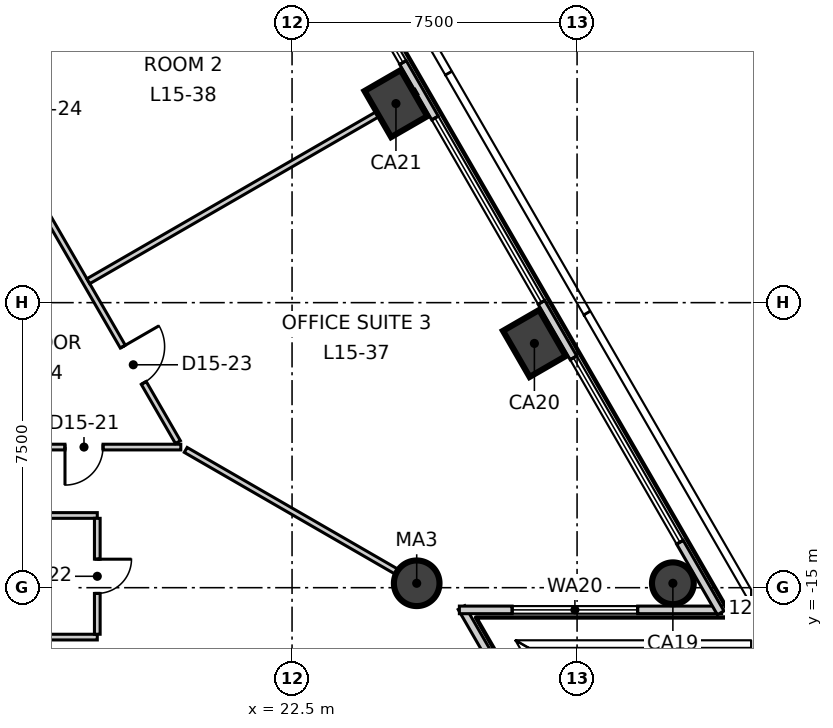
"""IFC4 building model, lengths in metres.
Left out: names, types, materials, properties, quantities, classifications, styles, units other than length and angle.
Written with IfcOpenShell. Run it as: python <this file> out.ifc"""

import sys

from ifc_helpers import new_model, si_unit, direction, frame, frame_2d, origin, origin_2d, place, context, subcontext, project, spatial, rectangle, circle, extrude, element, fill, save


model = new_model("IFC4")
c1 = context("Model", 3, precision=1e-05, world=origin(), true_north=direction((0.0, 1.0)))
c2 = subcontext(c1, "Body", "Model", "MODEL_VIEW")
j1 = project(units=[si_unit("LENGTHUNIT", "METRE"), si_unit("PLANEANGLEUNIT", "RADIAN")], contexts=[c1])
p1 = place(None, origin())
s1 = spatial("IfcSite", under=j1, at=p1, CompositionType="ELEMENT")
p2 = place(p1, origin())
s2 = spatial("IfcBuilding", under=s1, at=p2, CompositionType="ELEMENT")
p3 = place(p2, frame((0.0, 0.0, 71.3)))
s3 = spatial("IfcBuildingStorey", under=s2, at=p3, CompositionType="ELEMENT", Elevation=71.3)
p4 = place(p3, frame((32.521, -14.884, -0.3), z_axis=(0.0, 0.0, 1.0), x_axis=(-0.5, 0.866025403784, 0.0)))
e1 = element("IfcColumn", 1, at=p4, inside=s3, PredefinedType="COLUMN", context=c2, shape_type="SweptSolid", body=[
    extrude(circle(Radius=0.55, at=origin_2d()), origin(), (0.0, 0.0, 1.0), 4.0),
])
for number, where, z_axis, x_axis in (
    (2, (28.877, -8.573, -0.3), (0.0, 0.0, 1.0), (-0.5, 0.866, 0.0)),
    (3, (25.234, -2.262, -0.3), (0.0, 0.0, 1.0), (-0.5, 0.866, 0.0)),
):
    element("IfcColumn", number, at=place(p3, frame(where, z_axis=z_axis, x_axis=x_axis)), inside=s3, PredefinedType="COLUMN", context=c2, shape_type="SweptSolid", body=[
        extrude(rectangle(XDim=1.4, YDim=1.1, at=origin_2d()), origin(), (0.0, 0.0, 1.0), 4.0),
    ])
p5 = place(p3, frame((25.78, -14.884, -0.3), z_axis=(0.0, 0.0, 1.0), x_axis=(1.0, 0.0, 0.0)))
e4 = element("IfcColumn", 4, at=p5, inside=s3, PredefinedType="COLUMN", context=c2, shape_type="SweptSolid", body=[
    extrude(circle(Radius=0.6, at=origin_2d()), origin(), (0.0, 0.0, 1.0), 4.0),
])
p6 = place(p3, frame((30.408, -21.5, 0.0), z_axis=(0.0, 0.0, 1.0), x_axis=(-0.499902111801, 0.866081912187, 0.0)))
e5 = element("IfcWall", 5, at=p6, inside=s3, PredefinedType="ELEMENTEDWALL", context=c2, shape_type="SweptSolid", body=[
    extrude(rectangle(XDim=6.901, YDim=0.2, at=frame_2d((3.451, 0.0))), origin(), (0.0, 0.0, 1.0), 3.7),
])
p7 = place(p6, frame((1.99, 0.0, 0.9)))
e6 = element("IfcOpeningElement", 6, at=p7, cuts=e5, PredefinedType="OPENING", context=c2, shape_type="SweptSolid", body=[
    extrude(rectangle(XDim=3.3, YDim=2.5, at=frame_2d((1.65, 1.25))), frame((0.0, 0.11, 0.0), z_axis=(0.0, -1.0, 0.0), x_axis=(1.0, 0.0, 0.0)), (0.0, 0.0, 1.0), 0.22),
])
p8 = place(p3, frame((26.903, -15.584, 0.0), z_axis=(0.0, 0.0, 1.0), x_axis=(1.0, 0.0, 0.0)))
e7 = element("IfcWall", 7, at=p8, inside=s3, PredefinedType="ELEMENTEDWALL", context=c2, shape_type="SweptSolid", body=[
    extrude(rectangle(XDim=6.901, YDim=0.2, at=frame_2d((3.45, 0.0))), origin(), (0.0, 0.0, 1.0), 3.7),
])
p9 = place(p8, frame((1.39, 0.0, 0.9)))
e8 = element("IfcOpeningElement", 8, at=p9, cuts=e7, PredefinedType="OPENING", context=c2, shape_type="SweptSolid", body=[
    extrude(rectangle(XDim=3.3, YDim=2.5, at=frame_2d((1.65, 1.25))), frame((0.0, 0.11, 0.0), z_axis=(0.0, -1.0, 0.0), x_axis=(1.0, 0.0, 0.0)), (0.0, 0.0, 1.0), 0.22),
])
p10 = place(p3, frame((33.779, -15.662, 0.0), z_axis=(0.0, 0.0, 1.0), x_axis=(-0.500000131003, 0.86602532815, 0.0)))
e9 = element("IfcWall", 9, at=p10, inside=s3, PredefinedType="ELEMENTEDWALL", context=c2, shape_type="SweptSolid", body=[
    extrude(rectangle(XDim=60.886, YDim=0.2, at=frame_2d((30.443, 0.0))), origin(), (0.0, 0.0, 1.0), 3.7),
])
p11 = place(p10, frame((2.147, 0.0, 0.9)))
e10 = element("IfcOpeningElement", 10, at=p11, cuts=e9, PredefinedType="OPENING", context=c2, shape_type="SweptSolid", body=[
    extrude(rectangle(XDim=5.6, YDim=2.5, at=frame_2d((2.8, 1.25))), frame((0.0, 0.11, 0.0), z_axis=(0.0, -1.0, 0.0), x_axis=(1.0, 0.0, 0.0)), (0.0, 0.0, 1.0), 0.22),
])
p12 = place(p10, frame((9.434, 0.0, 0.9)))
e11 = element("IfcOpeningElement", 11, at=p12, cuts=e9, PredefinedType="OPENING", context=c2, shape_type="SweptSolid", body=[
    extrude(rectangle(XDim=5.6, YDim=2.5, at=frame_2d((2.8, 1.25))), frame((0.0, 0.11, 0.0), z_axis=(0.0, -1.0, 0.0), x_axis=(1.0, 0.0, 0.0)), (0.0, 0.0, 1.0), 0.22),
])
p13 = place(p10, frame((16.722, 0.0, 0.9)))
e12 = element("IfcOpeningElement", 12, at=p13, cuts=e9, PredefinedType="OPENING", context=c2, shape_type="SweptSolid", body=[
    extrude(rectangle(XDim=5.6, YDim=2.5, at=frame_2d((2.8, 1.25))), frame((0.0, 0.11, 0.0), z_axis=(0.0, -1.0, 0.0), x_axis=(1.0, 0.0, 0.0)), (0.0, 0.0, 1.0), 0.22),
])
p14 = place(p10, frame((24.009, 0.0, 0.9)))
e13 = element("IfcOpeningElement", 13, at=p14, cuts=e9, PredefinedType="OPENING", context=c2, shape_type="SweptSolid", body=[
    extrude(rectangle(XDim=5.6, YDim=2.5, at=frame_2d((2.8, 1.25))), frame((0.0, 0.11, 0.0), z_axis=(0.0, -1.0, 0.0), x_axis=(1.0, 0.0, 0.0)), (0.0, 0.0, 1.0), 0.22),
])
p15 = place(p10, frame((31.297, 0.0, 0.9)))
e14 = element("IfcOpeningElement", 14, at=p15, cuts=e9, PredefinedType="OPENING", context=c2, shape_type="SweptSolid", body=[
    extrude(rectangle(XDim=5.6, YDim=2.5, at=frame_2d((2.8, 1.25))), frame((0.0, 0.11, 0.0), z_axis=(0.0, -1.0, 0.0), x_axis=(1.0, 0.0, 0.0)), (0.0, 0.0, 1.0), 0.22),
])
p16 = place(p10, frame((38.584, 0.0, 0.9)))
e15 = element("IfcOpeningElement", 15, at=p16, cuts=e9, PredefinedType="OPENING", context=c2, shape_type="SweptSolid", body=[
    extrude(rectangle(XDim=5.6, YDim=2.5, at=frame_2d((2.8, 1.25))), frame((0.0, 0.11, 0.0), z_axis=(0.0, -1.0, 0.0), x_axis=(1.0, 0.0, 0.0)), (0.0, 0.0, 1.0), 0.22),
])
p17 = place(p10, frame((45.872, 0.0, 0.9)))
e16 = element("IfcOpeningElement", 16, at=p17, cuts=e9, PredefinedType="OPENING", context=c2, shape_type="SweptSolid", body=[
    extrude(rectangle(XDim=5.6, YDim=2.5, at=frame_2d((2.8, 1.25))), frame((0.0, 0.11, 0.0), z_axis=(0.0, -1.0, 0.0), x_axis=(1.0, 0.0, 0.0)), (0.0, 0.0, 1.0), 0.22),
])
p18 = place(p10, frame((53.16, 0.0, 0.9)))
e17 = element("IfcOpeningElement", 17, at=p18, cuts=e9, PredefinedType="OPENING", context=c2, shape_type="SweptSolid", body=[
    extrude(rectangle(XDim=5.6, YDim=2.5, at=frame_2d((2.8, 1.25))), frame((0.0, 0.11, 0.0), z_axis=(0.0, -1.0, 0.0), x_axis=(1.0, 0.0, 0.0)), (0.0, 0.0, 1.0), 0.22),
])
p19 = place(p3, frame((-19.422, -11.3, 0.0), z_axis=(0.0, 0.0, 1.0), x_axis=(1.0, 0.0, 0.0)))
e18 = element("IfcWall", 18, at=p19, inside=s3, PredefinedType="PARTITIONING", context=c2, shape_type="SweptSolid", body=[
    extrude(rectangle(XDim=38.994, YDim=0.15, at=frame_2d((19.497, 0.0))), origin(), (0.0, 0.0, 1.0), 3.7),
])
p20 = place(p19, frame((1.8, 0.0, 0.0)))
e19 = element("IfcOpeningElement", 19, at=p20, cuts=e18, PredefinedType="OPENING", context=c2, shape_type="SweptSolid", body=[
    extrude(rectangle(XDim=1.1, YDim=2.1, at=frame_2d((0.55, 1.05))), frame((0.0, 0.085, 0.0), z_axis=(0.0, -1.0, 0.0), x_axis=(1.0, 0.0, 0.0)), (0.0, 0.0, 1.0), 0.17),
])
p21 = place(p19, frame((9.197, 0.0, 0.0)))
e20 = element("IfcOpeningElement", 20, at=p21, cuts=e18, PredefinedType="OPENING", context=c2, shape_type="SweptSolid", body=[
    extrude(rectangle(XDim=1.0, YDim=2.1, at=frame_2d((0.5, 1.05))), frame((0.0, 0.085, 0.0), z_axis=(0.0, -1.0, 0.0), x_axis=(1.0, 0.0, 0.0)), (0.0, 0.0, 1.0), 0.17),
])
p22 = place(p19, frame((5.597, 0.0, 0.0)))
e21 = element("IfcOpeningElement", 21, at=p22, cuts=e18, PredefinedType="OPENING", context=c2, shape_type="SweptSolid", body=[
    extrude(rectangle(XDim=0.9, YDim=2.1, at=frame_2d((0.45, 1.05))), frame((0.0, 0.085, 0.0), z_axis=(0.0, -1.0, 0.0), x_axis=(1.0, 0.0, 0.0)), (0.0, 0.0, 1.0), 0.17),
])
p23 = place(p19, frame((23.284, 0.0, 0.0)))
e22 = element("IfcOpeningElement", 22, at=p23, cuts=e18, PredefinedType="OPENING", context=c2, shape_type="SweptSolid", body=[
    extrude(rectangle(XDim=1.1, YDim=2.1, at=frame_2d((0.55, 1.05))), frame((0.0, 0.085, 0.0), z_axis=(0.0, -1.0, 0.0), x_axis=(1.0, 0.0, 0.0)), (0.0, 0.0, 1.0), 0.17),
])
p24 = place(p19, frame((13.284, 0.0, 0.0)))
e23 = element("IfcOpeningElement", 23, at=p24, cuts=e18, PredefinedType="OPENING", context=c2, shape_type="SweptSolid", body=[
    extrude(rectangle(XDim=0.9, YDim=2.1, at=frame_2d((0.45, 1.05))), frame((0.0, 0.085, 0.0), z_axis=(0.0, -1.0, 0.0), x_axis=(1.0, 0.0, 0.0)), (0.0, 0.0, 1.0), 0.17),
])
p25 = place(p19, frame((16.484, 0.0, 0.0)))
e24 = element("IfcOpeningElement", 24, at=p25, cuts=e18, PredefinedType="OPENING", context=c2, shape_type="SweptSolid", body=[
    extrude(rectangle(XDim=0.9, YDim=2.1, at=frame_2d((0.45, 1.05))), frame((0.0, 0.085, 0.0), z_axis=(0.0, -1.0, 0.0), x_axis=(1.0, 0.0, 0.0)), (0.0, 0.0, 1.0), 0.17),
])
p26 = place(p19, frame((19.184, 0.0, 0.0)))
e25 = element("IfcOpeningElement", 25, at=p26, cuts=e18, PredefinedType="OPENING", context=c2, shape_type="SweptSolid", body=[
    extrude(rectangle(XDim=1.0, YDim=2.1, at=frame_2d((0.5, 1.05))), frame((0.0, 0.085, 0.0), z_axis=(0.0, -1.0, 0.0), x_axis=(1.0, 0.0, 0.0)), (0.0, 0.0, 1.0), 0.17),
])
p27 = place(p19, frame((29.86, 0.0, 0.0)))
e26 = element("IfcOpeningElement", 26, at=p27, cuts=e18, PredefinedType="OPENING", context=c2, shape_type="SweptSolid", body=[
    extrude(rectangle(XDim=1.0, YDim=2.1, at=frame_2d((0.5, 1.05))), frame((0.0, 0.085, 0.0), z_axis=(0.0, -1.0, 0.0), x_axis=(1.0, 0.0, 0.0)), (0.0, 0.0, 1.0), 0.17),
])
p28 = place(p19, frame((35.947, 0.0, 0.0)))
e27 = element("IfcOpeningElement", 27, at=p28, cuts=e18, PredefinedType="OPENING", context=c2, shape_type="SweptSolid", body=[
    extrude(rectangle(XDim=1.0, YDim=2.1, at=frame_2d((0.5, 1.05))), frame((0.0, 0.085, 0.0), z_axis=(0.0, -1.0, 0.0), x_axis=(1.0, 0.0, 0.0)), (0.0, 0.0, 1.0), 0.17),
])
p29 = place(p3, frame((19.702, -11.375, 0.0), z_axis=(0.0, 0.0, 1.0), x_axis=(0.866029632557, -0.499992675479, 0.0)))
e28 = element("IfcWall", 28, at=p29, inside=s3, PredefinedType="PARTITIONING", context=c2, shape_type="SweptSolid", body=[
    extrude(rectangle(XDim=7.638, YDim=0.15, at=frame_2d((3.819, 0.0))), origin(), (0.0, 0.0, 1.0), 3.1),
])
p30 = place(p3, frame((0.075, 22.47, 0.0), z_axis=(0.0, 0.0, 1.0), x_axis=(0.500002280369, -0.866024087209, 0.0)))
e29 = element("IfcWall", 29, at=p30, inside=s3, PredefinedType="PARTITIONING", context=c2, shape_type="SweptSolid", body=[
    extrude(rectangle(XDim=38.844, YDim=0.15, at=frame_2d((19.422, 0.0))), origin(), (0.0, 0.0, 1.0), 3.7),
])
p31 = place(p30, frame((35.944, 0.0, 0.0)))
e30 = element("IfcOpeningElement", 30, at=p31, cuts=e29, PredefinedType="OPENING", context=c2, shape_type="SweptSolid", body=[
    extrude(rectangle(XDim=1.1, YDim=2.1, at=frame_2d((0.55, 1.05))), frame((0.0, 0.085, 0.0), z_axis=(0.0, -1.0, 0.0), x_axis=(1.0, 0.0, 0.0)), (0.0, 0.0, 1.0), 0.17),
])
p32 = place(p30, frame((29.848, 0.0, 0.0)))
e31 = element("IfcOpeningElement", 31, at=p32, cuts=e29, PredefinedType="OPENING", context=c2, shape_type="SweptSolid", body=[
    extrude(rectangle(XDim=1.0, YDim=2.1, at=frame_2d((0.5, 1.05))), frame((0.0, 0.085, 0.0), z_axis=(0.0, -1.0, 0.0), x_axis=(1.0, 0.0, 0.0)), (0.0, 0.0, 1.0), 0.17),
])
p33 = place(p30, frame((14.46, 0.0, 0.0)))
e32 = element("IfcOpeningElement", 32, at=p33, cuts=e29, PredefinedType="OPENING", context=c2, shape_type="SweptSolid", body=[
    extrude(rectangle(XDim=1.1, YDim=2.1, at=frame_2d((0.55, 1.05))), frame((0.0, 0.085, 0.0), z_axis=(0.0, -1.0, 0.0), x_axis=(1.0, 0.0, 0.0)), (0.0, 0.0, 1.0), 0.17),
])
p34 = place(p30, frame((24.66, 0.0, 0.0)))
e33 = element("IfcOpeningElement", 33, at=p34, cuts=e29, PredefinedType="OPENING", context=c2, shape_type="SweptSolid", body=[
    extrude(rectangle(XDim=0.9, YDim=2.1, at=frame_2d((0.45, 1.05))), frame((0.0, 0.085, 0.0), z_axis=(0.0, -1.0, 0.0), x_axis=(1.0, 0.0, 0.0)), (0.0, 0.0, 1.0), 0.17),
])
p35 = place(p30, frame((21.46, 0.0, 0.0)))
e34 = element("IfcOpeningElement", 34, at=p35, cuts=e29, PredefinedType="OPENING", context=c2, shape_type="SweptSolid", body=[
    extrude(rectangle(XDim=0.9, YDim=2.1, at=frame_2d((0.45, 1.05))), frame((0.0, 0.085, 0.0), z_axis=(0.0, -1.0, 0.0), x_axis=(1.0, 0.0, 0.0)), (0.0, 0.0, 1.0), 0.17),
])
p36 = place(p30, frame((18.66, 0.0, 0.0)))
e35 = element("IfcOpeningElement", 35, at=p36, cuts=e29, PredefinedType="OPENING", context=c2, shape_type="SweptSolid", body=[
    extrude(rectangle(XDim=1.0, YDim=2.1, at=frame_2d((0.5, 1.05))), frame((0.0, 0.085, 0.0), z_axis=(0.0, -1.0, 0.0), x_axis=(1.0, 0.0, 0.0)), (0.0, 0.0, 1.0), 0.17),
])
p37 = place(p30, frame((6.785, 0.0, 0.0)))
e36 = element("IfcOpeningElement", 36, at=p37, cuts=e29, PredefinedType="OPENING", context=c2, shape_type="SweptSolid", body=[
    extrude(rectangle(XDim=1.0, YDim=2.1, at=frame_2d((0.5, 1.05))), frame((0.0, 0.085, 0.0), z_axis=(0.0, -1.0, 0.0), x_axis=(1.0, 0.0, 0.0)), (0.0, 0.0, 1.0), 0.17),
])
p38 = place(p30, frame((10.485, 0.0, 0.0)))
e37 = element("IfcOpeningElement", 37, at=p38, cuts=e29, PredefinedType="OPENING", context=c2, shape_type="SweptSolid", body=[
    extrude(rectangle(XDim=0.9, YDim=2.1, at=frame_2d((0.45, 1.05))), frame((0.0, 0.085, 0.0), z_axis=(0.0, -1.0, 0.0), x_axis=(1.0, 0.0, 0.0)), (0.0, 0.0, 1.0), 0.17),
])
p39 = place(p30, frame((1.796, 0.0, 0.0)))
e38 = element("IfcOpeningElement", 38, at=p39, cuts=e29, PredefinedType="OPENING", context=c2, shape_type="SweptSolid", body=[
    extrude(rectangle(XDim=1.1, YDim=2.1, at=frame_2d((0.55, 1.05))), frame((0.0, 0.085, 0.0), z_axis=(0.0, -1.0, 0.0), x_axis=(1.0, 0.0, 0.0)), (0.0, 0.0, 1.0), 0.17),
])
p40 = place(p3, frame((17.139, -6.936, 0.0), z_axis=(0.0, 0.0, 1.0), x_axis=(0.866008152443, 0.500029879009, 0.0)))
e39 = element("IfcWall", 39, at=p40, inside=s3, PredefinedType="PARTITIONING", context=c2, shape_type="SweptSolid", body=[
    extrude(rectangle(XDim=9.968, YDim=0.15, at=frame_2d((4.984, 0.0))), origin(), (0.0, 0.0, 1.0), 3.7),
])
for number, where, z_axis, x_axis in (
    (40, (14.65, -13.1, 0.0), (0.0, 0.0, 1.0), (1.0, 0.0, 0.0)),
    (41, (14.65, -16.3, 0.0), (0.0, 0.0, 1.0), (1.0, 0.0, 0.0)),
):
    element("IfcWall", number, at=place(p3, frame(where, z_axis=z_axis, x_axis=x_axis)), inside=s3, PredefinedType="PARTITIONING", context=c2, shape_type="SweptSolid", body=[
        extrude(rectangle(XDim=2.725, YDim=0.15, at=frame_2d((1.363, 0.0))), origin(), (0.0, 0.0, 1.0), 3.7),
    ])
p41 = place(p3, frame((17.375, -16.225, 0.0), z_axis=(0.0, 0.0, 1.0), x_axis=(0.0, 1.0, 0.0)))
e42 = element("IfcWall", 42, at=p41, inside=s3, PredefinedType="PARTITIONING", context=c2, shape_type="SweptSolid", body=[
    extrude(rectangle(XDim=3.05, YDim=0.15, at=frame_2d((1.525, 0.0))), origin(), (0.0, 0.0, 1.0), 3.7),
])
p42 = place(p41, frame((1.075, 0.0, 0.0)))
e43 = element("IfcOpeningElement", 43, at=p42, cuts=e42, PredefinedType="OPENING", context=c2, shape_type="SweptSolid", body=[
    extrude(rectangle(XDim=0.9, YDim=2.1, at=frame_2d((0.45, 1.05))), frame((0.0, 0.085, 0.0), z_axis=(0.0, -1.0, 0.0), x_axis=(1.0, 0.0, 0.0)), (0.0, 0.0, 1.0), 0.17),
])
p43 = place(p9, origin())
e44 = element("IfcWindow", 44, at=p43, inside=s3, PartitioningType="SINGLE_PANEL", PredefinedType="WINDOW", context=c2, shape_type="SweptSolid", body=[
    extrude(rectangle(XDim=3.3, YDim=2.5, at=frame_2d((1.65, 1.25))), frame((0.0, 0.03, 0.0), z_axis=(0.0, -1.0, 0.0), x_axis=(1.0, 0.0, 0.0)), (0.0, 0.0, 1.0), 0.06),
])
fill(e8, e44)
p44 = place(p11, origin())
e45 = element("IfcWindow", 45, at=p44, inside=s3, PartitioningType="SINGLE_PANEL", PredefinedType="WINDOW", context=c2, shape_type="SweptSolid", body=[
    extrude(rectangle(XDim=5.6, YDim=2.5, at=frame_2d((2.8, 1.25))), frame((0.0, 0.03, 0.0), z_axis=(0.0, -1.0, 0.0), x_axis=(1.0, 0.0, 0.0)), (0.0, 0.0, 1.0), 0.06),
])
fill(e10, e45)
p45 = place(p12, origin())
e46 = element("IfcWindow", 46, at=p45, inside=s3, PartitioningType="SINGLE_PANEL", PredefinedType="WINDOW", context=c2, shape_type="SweptSolid", body=[
    extrude(rectangle(XDim=5.6, YDim=2.5, at=frame_2d((2.8, 1.25))), frame((0.0, 0.03, 0.0), z_axis=(0.0, -1.0, 0.0), x_axis=(1.0, 0.0, 0.0)), (0.0, 0.0, 1.0), 0.06),
])
fill(e11, e46)
p46 = place(p13, origin())
e47 = element("IfcWindow", 47, at=p46, inside=s3, PartitioningType="SINGLE_PANEL", PredefinedType="WINDOW", context=c2, shape_type="SweptSolid", body=[
    extrude(rectangle(XDim=5.6, YDim=2.5, at=frame_2d((2.8, 1.25))), frame((0.0, 0.03, 0.0), z_axis=(0.0, -1.0, 0.0), x_axis=(1.0, 0.0, 0.0)), (0.0, 0.0, 1.0), 0.06),
])
fill(e12, e47)
p47 = place(p28, origin())
e48 = element("IfcDoor", 48, at=p47, inside=s3, OperationType="SINGLE_SWING_LEFT", PredefinedType="DOOR", context=c2, shape_type="SweptSolid", body=[
    extrude(rectangle(XDim=1.0, YDim=2.1, at=frame_2d((0.5, 1.05))), frame((0.0, 0.025, 0.0), z_axis=(0.0, -1.0, 0.0), x_axis=(1.0, 0.0, 0.0)), (0.0, 0.0, 1.0), 0.05),
])
fill(e27, e48)
p48 = place(p42, origin())
e49 = element("IfcDoor", 49, at=p48, inside=s3, OperationType="SINGLE_SWING_RIGHT", PredefinedType="DOOR", context=c2, shape_type="SweptSolid", body=[
    extrude(rectangle(XDim=0.9, YDim=2.1, at=frame_2d((0.45, 1.05))), frame((0.0, 0.025, 0.0), z_axis=(0.0, -1.0, 0.0), x_axis=(1.0, 0.0, 0.0)), (0.0, 0.0, 1.0), 0.05),
])
fill(e43, e49)
p49 = place(p31, origin())
e50 = element("IfcDoor", 50, at=p49, inside=s3, OperationType="SINGLE_SWING_RIGHT", PredefinedType="DOOR", context=c2, shape_type="SweptSolid", body=[
    extrude(rectangle(XDim=1.1, YDim=2.1, at=frame_2d((0.55, 1.05))), frame((0.0, 0.025, 0.0), z_axis=(0.0, -1.0, 0.0), x_axis=(1.0, 0.0, 0.0)), (0.0, 0.0, 1.0), 0.05),
])
fill(e30, e50)
save(model, sys.argv[1])
